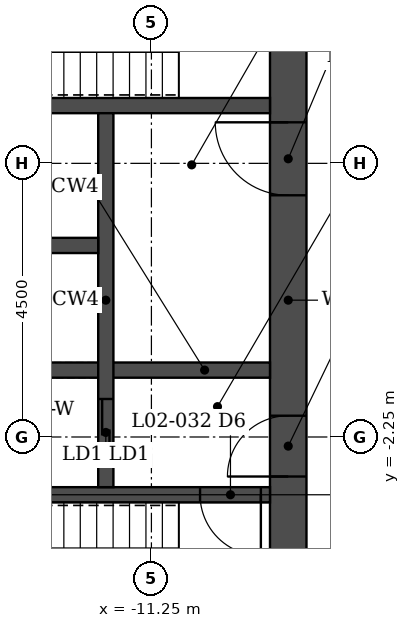
"""IFC4 building model, lengths in metres.
Left out: names, types, materials, properties, quantities, classifications, styles, units other than length and angle.
Written with IfcOpenShell. Run it as: python <this file> out.ifc"""

import sys

from ifc_helpers import new_model, si_unit, direction, frame, frame_2d, origin, place, context, subcontext, project, spatial, rectangle, extrude, element, fill, save


model = new_model("IFC4")
c1 = context("Model", 3, precision=1e-05, world=origin(), true_north=direction((0.0, 1.0)))
c2 = subcontext(c1, "Body", "Model", "MODEL_VIEW")
j1 = project(units=[si_unit("LENGTHUNIT", "METRE"), si_unit("PLANEANGLEUNIT", "RADIAN")], contexts=[c1])
p1 = place(None, origin())
s1 = spatial("IfcSite", under=j1, at=p1, CompositionType="ELEMENT")
p2 = place(p1, origin())
s2 = spatial("IfcBuilding", under=s1, at=p2, CompositionType="ELEMENT")
p3 = place(p2, frame((0.0, 0.0, 11.0)))
s3 = spatial("IfcBuildingStorey", under=s2, at=p3, CompositionType="ELEMENT", Elevation=11.0)
p4 = place(p3, frame((-9.0, -6.45, 0.0), z_axis=(0.0, 0.0, 1.0), x_axis=(0.0, 1.0, 0.0)))
e1 = element("IfcWall", 1, at=p4, inside=s3, PredefinedType="SHEAR", context=c2, shape_type="SweptSolid", body=[
    extrude(rectangle(XDim=12.9, YDim=0.6, at=frame_2d((6.45, 0.0))), origin(), (0.0, 0.0, 1.0), 5.0),
])
p5 = place(p4, frame((3.55, 0.0, 0.0)))
e2 = element("IfcOpeningElement", 2, at=p5, cuts=e1, PredefinedType="OPENING", context=c2, shape_type="SweptSolid", body=[
    extrude(rectangle(XDim=1.0, YDim=2.1, at=frame_2d((0.5, 1.05))), frame((0.0, 0.31, 0.0), z_axis=(0.0, -1.0, 0.0), x_axis=(1.0, 0.0, 0.0)), (0.0, 0.0, 1.0), 0.62),
])
p6 = place(p4, frame((8.175, 0.0, 0.0)))
e3 = element("IfcOpeningElement", 3, at=p6, cuts=e1, PredefinedType="OPENING", context=c2, shape_type="SweptSolid", body=[
    extrude(rectangle(XDim=1.2, YDim=2.1, at=frame_2d((0.6, 1.05))), frame((0.0, 0.31, 0.0), z_axis=(0.0, -1.0, 0.0), x_axis=(1.0, 0.0, 0.0)), (0.0, 0.0, 1.0), 0.62),
])
p7 = place(p4, frame((10.85, 0.0, 0.0)))
e4 = element("IfcOpeningElement", 4, at=p7, cuts=e1, PredefinedType="OPENING", context=c2, shape_type="SweptSolid", body=[
    extrude(rectangle(XDim=1.0, YDim=2.1, at=frame_2d((0.5, 1.05))), frame((0.0, 0.31, 0.0), z_axis=(0.0, -1.0, 0.0), x_axis=(1.0, 0.0, 0.0)), (0.0, 0.0, 1.0), 0.62),
])
p8 = place(p3, frame((-9.3, -3.2, 0.0), z_axis=(0.0, 0.0, 1.0), x_axis=(-1.0, 0.0, 0.0)))
e5 = element("IfcWall", 5, at=p8, inside=s3, PredefinedType="SHEAR", context=c2, shape_type="SweptSolid", body=[
    extrude(rectangle(XDim=8.4, YDim=0.25, at=frame_2d((4.2, 0.0))), origin(), (0.0, 0.0, 1.0), 5.0),
])
p9 = place(p8, frame((0.15, 0.0, 0.0)))
e6 = element("IfcOpeningElement", 6, at=p9, cuts=e5, PredefinedType="OPENING", context=c2, shape_type="SweptSolid", body=[
    extrude(rectangle(XDim=1.0, YDim=2.1, at=frame_2d((0.5, 1.05))), frame((0.0, 0.135, 0.0), z_axis=(0.0, -1.0, 0.0), x_axis=(1.0, 0.0, 0.0)), (0.0, 0.0, 1.0), 0.27),
])
p10 = place(p3, frame((-9.3, 3.2, 0.0), z_axis=(0.0, 0.0, 1.0), x_axis=(-1.0, 0.0, 0.0)))
e7 = element("IfcWall", 7, at=p10, inside=s3, PredefinedType="SHEAR", context=c2, shape_type="SweptSolid", body=[
    extrude(rectangle(XDim=8.4, YDim=0.25, at=frame_2d((4.2, 0.0))), origin(), (0.0, 0.0, 1.0), 5.0),
])
p11 = place(p3, frame((-9.3, -1.15, 0.0), z_axis=(0.0, 0.0, 1.0), x_axis=(-1.0, 0.0, 0.0)))
e8 = element("IfcWall", 8, at=p11, inside=s3, PredefinedType="SHEAR", context=c2, shape_type="SweptSolid", body=[
    extrude(rectangle(XDim=5.375, YDim=0.25, at=frame_2d((2.688, 0.0))), origin(), (0.0, 0.0, 1.0), 5.0),
])
p12 = place(p3, frame((-12.0, -3.075, 0.0), z_axis=(0.0, 0.0, 1.0), x_axis=(0.0, 1.0, 0.0)))
e9 = element("IfcWall", 9, at=p12, inside=s3, PredefinedType="SHEAR", context=c2, shape_type="SweptSolid", body=[
    extrude(rectangle(XDim=6.15, YDim=0.25, at=frame_2d((3.075, 0.0))), origin(), (0.0, 0.0, 1.0), 5.0),
])
p13 = place(p12, frame((0.35, 0.0, 0.0)))
e10 = element("IfcOpeningElement", 10, at=p13, cuts=e9, PredefinedType="OPENING", context=c2, shape_type="SweptSolid", body=[
    extrude(rectangle(XDim=1.1, YDim=2.1, at=frame_2d((0.55, 1.05))), frame((0.0, 0.135, 0.0), z_axis=(0.0, -1.0, 0.0), x_axis=(1.0, 0.0, 0.0)), (0.0, 0.0, 1.0), 0.27),
])
p14 = place(p3, frame((-12.125, 0.9, 0.0), z_axis=(0.0, 0.0, 1.0), x_axis=(-1.0, 0.0, 0.0)))
e11 = element("IfcWall", 11, at=p14, inside=s3, PredefinedType="SHEAR", context=c2, shape_type="SweptSolid", body=[
    extrude(rectangle(XDim=2.55, YDim=0.25, at=frame_2d((1.275, 0.0))), origin(), (0.0, 0.0, 1.0), 5.0),
])
p15 = place(p5, origin())
e12 = element("IfcDoor", 12, at=p15, inside=s3, OperationType="SINGLE_SWING_LEFT", PredefinedType="DOOR", context=c2, shape_type="SweptSolid", body=[
    extrude(rectangle(XDim=1.0, YDim=2.1, at=frame_2d((0.5, 1.05))), frame((0.0, 0.025, 0.0), z_axis=(0.0, -1.0, 0.0), x_axis=(1.0, 0.0, 0.0)), (0.0, 0.0, 1.0), 0.05),
])
fill(e2, e12)
p16 = place(p9, origin())
e13 = element("IfcDoor", 13, at=p16, inside=s3, OperationType="SINGLE_SWING_LEFT", PredefinedType="DOOR", context=c2, shape_type="SweptSolid", body=[
    extrude(rectangle(XDim=1.0, YDim=2.1, at=frame_2d((0.5, 1.05))), frame((0.0, 0.025, 0.0), z_axis=(0.0, -1.0, 0.0), x_axis=(1.0, 0.0, 0.0)), (0.0, 0.0, 1.0), 0.05),
])
fill(e6, e13)
p17 = place(p6, origin())
e14 = element("IfcDoor", 14, at=p17, inside=s3, OperationType="SINGLE_SWING_RIGHT", PredefinedType="DOOR", context=c2, shape_type="SweptSolid", body=[
    extrude(rectangle(XDim=1.2, YDim=2.1, at=frame_2d((0.6, 1.05))), frame((0.0, 0.025, 0.0), z_axis=(0.0, -1.0, 0.0), x_axis=(1.0, 0.0, 0.0)), (0.0, 0.0, 1.0), 0.05),
])
fill(e3, e14)
p18 = place(p13, origin())
e15 = element("IfcDoor", 15, at=p18, inside=s3, OperationType="DOUBLE_DOOR_SLIDING", PredefinedType="DOOR", context=c2, shape_type="SweptSolid", body=[
    extrude(rectangle(XDim=1.1, YDim=2.1, at=frame_2d((0.55, 1.05))), frame((0.0, 0.025, 0.0), z_axis=(0.0, -1.0, 0.0), x_axis=(1.0, 0.0, 0.0)), (0.0, 0.0, 1.0), 0.05),
])
fill(e10, e15)
save(model, sys.argv[1])
